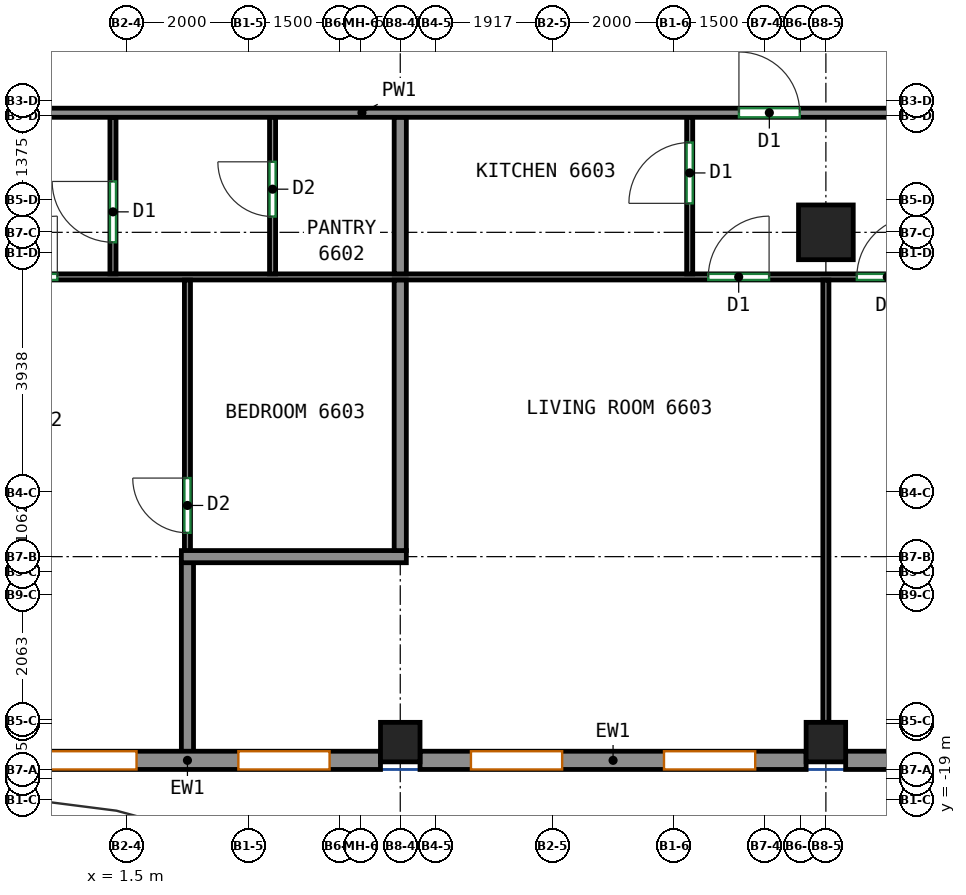
"""IFC4 building model, lengths in metres.
Left out: names, types, materials, properties, quantities, classifications, styles, units other than length and angle.
Written with IfcOpenShell. Run it as: python <this file> out.ifc"""

import sys

from ifc_helpers import new_model, si_unit, direction, frame, frame_2d, origin, origin_2d, place, context, subcontext, project, spatial, rectangle, extrude, source, transform, mapped, element, fill, save


model = new_model("IFC4")
c1 = context("Model", 3, precision=1e-05, world=origin(), true_north=direction((0.0, 1.0)))
c2 = subcontext(c1, "Body", "Model", "MODEL_VIEW")
j1 = project(units=[si_unit("LENGTHUNIT", "METRE"), si_unit("PLANEANGLEUNIT", "RADIAN")], contexts=[c1])
p1 = place(None, origin())
s1 = spatial("IfcSite", under=j1, at=p1, CompositionType="ELEMENT")
p2 = place(p1, origin())
s2 = spatial("IfcBuilding", under=s1, at=p2, CompositionType="ELEMENT")
p3 = place(p2, frame((0.0, 0.0, 270.4)))
s3 = spatial("IfcBuildingStorey", under=s2, at=p3, CompositionType="ELEMENT", Elevation=270.4)
m1 = source(origin(), c2, "Body", "SweptSolid", [
    extrude(rectangle(XDim=0.65, YDim=0.65, at=origin_2d()), origin(), (0.0, 0.0, 1.0), 3.12),
])
for number, where, z_axis, x_axis in (
    (1, (6.0, -18.05, 0.0), (0.0, 0.0, 1.0), (1.0, 0.0, 0.0)),
    (2, (13.0, -18.05, 0.0), (0.0, 0.0, 1.0), (1.0, 0.0, 0.0)),
):
    element("IfcColumn", number, at=place(p3, frame(where, z_axis=z_axis, x_axis=x_axis)), inside=s3, PredefinedType="COLUMN", context=c2, shape_type="MappedRepresentation", body=[
        mapped(m1, transform((0.0, 0.0, 0.0))),
    ])
m2 = source(origin(), c2, "Body", "SweptSolid", [
    extrude(rectangle(XDim=0.9, YDim=0.9, at=origin_2d()), origin(), (0.0, 0.0, 1.0), 3.12),
])
p4 = place(p3, frame((13.0, -9.667, 0.0), z_axis=(0.0, 0.0, 1.0), x_axis=(1.0, 0.0, 0.0)))
e3 = element("IfcColumn", 3, at=p4, inside=s3, PredefinedType="COLUMN", context=c2, shape_type="MappedRepresentation", body=[
    mapped(m2, transform((0.0, 0.0, 0.0))),
])
m3 = source(origin(), c2, "Body", "SweptSolid", [
    extrude(rectangle(XDim=6.35, YDim=0.3, at=frame_2d((3.175, 0.0))), origin(), (0.0, 0.0, 1.0), 3.12),
])
p5 = place(p3, frame((-0.675, -18.35, 0.0), z_axis=(0.0, 0.0, 1.0), x_axis=(1.0, 0.0, 0.0)))
e4 = element("IfcWall", 4, at=p5, inside=s3, PredefinedType="SOLIDWALL", context=c2, shape_type="MappedRepresentation", body=[
    mapped(m3, transform((0.0, 0.0, 0.0))),
])
p6 = place(p5, frame((0.837, 0.0, 0.8)))
e5 = element("IfcOpeningElement", 5, at=p6, cuts=e4, PredefinedType="OPENING", context=c2, shape_type="SweptSolid", body=[
    extrude(rectangle(XDim=1.5, YDim=2.05, at=frame_2d((0.75, 1.025))), frame((0.0, 0.16, 0.0), z_axis=(0.0, -1.0, 0.0), x_axis=(1.0, 0.0, 0.0)), (0.0, 0.0, 1.0), 0.32),
])
p7 = place(p5, frame((4.012, 0.0, 0.8)))
e6 = element("IfcOpeningElement", 6, at=p7, cuts=e4, PredefinedType="OPENING", context=c2, shape_type="SweptSolid", body=[
    extrude(rectangle(XDim=1.5, YDim=2.05, at=frame_2d((0.75, 1.025))), frame((0.0, 0.16, 0.0), z_axis=(0.0, -1.0, 0.0), x_axis=(1.0, 0.0, 0.0)), (0.0, 0.0, 1.0), 0.32),
])
p8 = place(p3, frame((6.325, -18.35, 0.0), z_axis=(0.0, 0.0, 1.0), x_axis=(1.0, 0.0, 0.0)))
e7 = element("IfcWall", 7, at=p8, inside=s3, PredefinedType="SOLIDWALL", context=c2, shape_type="MappedRepresentation", body=[
    mapped(m3, transform((0.0, 0.0, 0.0))),
])
p9 = place(p8, frame((0.837, 0.0, 0.8)))
e8 = element("IfcOpeningElement", 8, at=p9, cuts=e7, PredefinedType="OPENING", context=c2, shape_type="SweptSolid", body=[
    extrude(rectangle(XDim=1.5, YDim=2.05, at=frame_2d((0.75, 1.025))), frame((0.0, 0.16, 0.0), z_axis=(0.0, -1.0, 0.0), x_axis=(1.0, 0.0, 0.0)), (0.0, 0.0, 1.0), 0.32),
])
p10 = place(p8, frame((4.012, 0.0, 0.8)))
e9 = element("IfcOpeningElement", 9, at=p10, cuts=e7, PredefinedType="OPENING", context=c2, shape_type="SweptSolid", body=[
    extrude(rectangle(XDim=1.5, YDim=2.05, at=frame_2d((0.75, 1.025))), frame((0.0, 0.16, 0.0), z_axis=(0.0, -1.0, 0.0), x_axis=(1.0, 0.0, 0.0)), (0.0, 0.0, 1.0), 0.32),
])
p11 = place(p3, frame((13.325, -18.35, 0.0), z_axis=(0.0, 0.0, 1.0), x_axis=(1.0, 0.0, 0.0)))
e10 = element("IfcWall", 10, at=p11, inside=s3, PredefinedType="SOLIDWALL", context=c2, shape_type="MappedRepresentation", body=[
    mapped(m3, transform((0.0, 0.0, 0.0))),
])
p12 = place(p11, frame((0.837, 0.0, 0.8)))
e11 = element("IfcOpeningElement", 11, at=p12, cuts=e10, PredefinedType="OPENING", context=c2, shape_type="SweptSolid", body=[
    extrude(rectangle(XDim=1.5, YDim=2.05, at=frame_2d((0.75, 1.025))), frame((0.0, 0.16, 0.0), z_axis=(0.0, -1.0, 0.0), x_axis=(1.0, 0.0, 0.0)), (0.0, 0.0, 1.0), 0.32),
])
p13 = place(p11, frame((4.012, 0.0, 0.8)))
e12 = element("IfcOpeningElement", 12, at=p13, cuts=e10, PredefinedType="OPENING", context=c2, shape_type="SweptSolid", body=[
    extrude(rectangle(XDim=1.5, YDim=2.05, at=frame_2d((0.75, 1.025))), frame((0.0, 0.16, 0.0), z_axis=(0.0, -1.0, 0.0), x_axis=(1.0, 0.0, 0.0)), (0.0, 0.0, 1.0), 0.32),
])
p14 = place(p3, frame((-4.51, -7.7, 0.0), z_axis=(0.0, 0.0, 1.0), x_axis=(1.0, 0.0, 0.0)))
e13 = element("IfcWall", 13, at=p14, inside=s3, PredefinedType="PARTITIONING", context=c2, shape_type="SweptSolid", body=[
    extrude(rectangle(XDim=19.76, YDim=0.15, at=frame_2d((9.88, 0.0))), origin(), (0.0, 0.0, 1.0), 3.12),
])
p15 = place(p14, frame((3.566, 0.0, 0.0)))
e14 = element("IfcOpeningElement", 14, at=p15, cuts=e13, PredefinedType="OPENING", context=c2, shape_type="SweptSolid", body=[
    extrude(rectangle(XDim=1.0, YDim=2.1, at=frame_2d((0.5, 1.05))), frame((0.0, 0.085, 0.0), z_axis=(0.0, -1.0, 0.0), x_axis=(1.0, 0.0, 0.0)), (0.0, 0.0, 1.0), 0.17),
])
p16 = place(p14, frame((16.08, 0.0, 0.0)))
e15 = element("IfcOpeningElement", 15, at=p16, cuts=e13, PredefinedType="OPENING", context=c2, shape_type="SweptSolid", body=[
    extrude(rectangle(XDim=1.0, YDim=2.1, at=frame_2d((0.5, 1.05))), frame((0.0, 0.085, 0.0), z_axis=(0.0, -1.0, 0.0), x_axis=(1.0, 0.0, 0.0)), (0.0, 0.0, 1.0), 0.17),
])
p17 = place(p3, frame((-4.6, -10.4, 0.0), z_axis=(0.0, 0.0, 1.0), x_axis=(1.0, 0.0, 0.0)))
e16 = element("IfcWall", 16, at=p17, inside=s3, PredefinedType="PARTITIONING", context=c2, shape_type="SweptSolid", body=[
    extrude(rectangle(XDim=22.35, YDim=0.1, at=frame_2d((11.175, 0.0))), origin(), (0.0, 0.0, 1.0), 3.12),
])
p18 = place(p17, frame((3.96, 0.0, 0.0)))
e17 = element("IfcOpeningElement", 17, at=p18, cuts=e16, PredefinedType="OPENING", context=c2, shape_type="SweptSolid", body=[
    extrude(rectangle(XDim=1.0, YDim=2.1, at=frame_2d((0.5, 1.05))), frame((0.0, 0.06, 0.0), z_axis=(0.0, -1.0, 0.0), x_axis=(1.0, 0.0, 0.0)), (0.0, 0.0, 1.0), 0.12),
])
p19 = place(p17, frame((15.666, 0.0, 0.0)))
e18 = element("IfcOpeningElement", 18, at=p19, cuts=e16, PredefinedType="OPENING", context=c2, shape_type="SweptSolid", body=[
    extrude(rectangle(XDim=1.0, YDim=2.1, at=frame_2d((0.5, 1.05))), frame((0.0, 0.06, 0.0), z_axis=(0.0, -1.0, 0.0), x_axis=(1.0, 0.0, 0.0)), (0.0, 0.0, 1.0), 0.12),
])
p20 = place(p17, frame((18.109, 0.0, 0.0)))
e19 = element("IfcOpeningElement", 19, at=p20, cuts=e16, PredefinedType="OPENING", context=c2, shape_type="SweptSolid", body=[
    extrude(rectangle(XDim=1.0, YDim=2.1, at=frame_2d((0.5, 1.05))), frame((0.0, 0.06, 0.0), z_axis=(0.0, -1.0, 0.0), x_axis=(1.0, 0.0, 0.0)), (0.0, 0.0, 1.0), 0.12),
])
p21 = place(p3, frame((1.275, -10.35, 0.0), z_axis=(0.0, 0.0, 1.0), x_axis=(0.0, 1.0, 0.0)))
e20 = element("IfcWall", 20, at=p21, inside=s3, PredefinedType="PARTITIONING", context=c2, shape_type="SweptSolid", body=[
    extrude(rectangle(XDim=2.573, YDim=0.1, at=frame_2d((1.287, 0.0))), origin(), (0.0, 0.0, 1.0), 3.12),
])
p22 = place(p21, frame((0.52, 0.0, 0.0)))
e21 = element("IfcOpeningElement", 21, at=p22, cuts=e20, PredefinedType="OPENING", context=c2, shape_type="SweptSolid", body=[
    extrude(rectangle(XDim=1.0, YDim=2.1, at=frame_2d((0.5, 1.05))), frame((0.0, 0.06, 0.0), z_axis=(0.0, -1.0, 0.0), x_axis=(1.0, 0.0, 0.0)), (0.0, 0.0, 1.0), 0.12),
])
p23 = place(p3, frame((3.9, -10.35, 0.0), z_axis=(0.0, 0.0, 1.0), x_axis=(0.0, 1.0, 0.0)))
e22 = element("IfcWall", 22, at=p23, inside=s3, PredefinedType="PARTITIONING", context=c2, shape_type="SweptSolid", body=[
    extrude(rectangle(XDim=2.573, YDim=0.1, at=frame_2d((1.287, 0.0))), origin(), (0.0, 0.0, 1.0), 3.12),
])
p24 = place(p23, frame((0.943, 0.0, 0.0)))
e23 = element("IfcOpeningElement", 23, at=p24, cuts=e22, PredefinedType="OPENING", context=c2, shape_type="SweptSolid", body=[
    extrude(rectangle(XDim=0.9, YDim=2.1, at=frame_2d((0.45, 1.05))), frame((0.0, 0.06, 0.0), z_axis=(0.0, -1.0, 0.0), x_axis=(1.0, 0.0, 0.0)), (0.0, 0.0, 1.0), 0.12),
])
p25 = place(p3, frame((6.0, -10.35, 0.0), z_axis=(0.0, 0.0, 1.0), x_axis=(0.0, 1.0, 0.0)))
e24 = element("IfcWall", 24, at=p25, inside=s3, PredefinedType="PARTITIONING", context=c2, shape_type="SweptSolid", body=[
    extrude(rectangle(XDim=2.573, YDim=0.2, at=frame_2d((1.287, 0.0))), origin(), (0.0, 0.0, 1.0), 3.12),
])
p26 = place(p3, frame((2.5, -14.91, 0.0), z_axis=(0.0, 0.0, 1.0), x_axis=(0.0, 1.0, 0.0)))
e25 = element("IfcWall", 25, at=p26, inside=s3, PredefinedType="PARTITIONING", context=c2, shape_type="SweptSolid", body=[
    extrude(rectangle(XDim=4.458, YDim=0.1, at=frame_2d((2.229, 0.0))), origin(), (0.0, 0.0, 1.0), 3.12),
])
p27 = place(p26, frame((0.302, 0.0, 0.0)))
e26 = element("IfcOpeningElement", 26, at=p27, cuts=e25, PredefinedType="OPENING", context=c2, shape_type="SweptSolid", body=[
    extrude(rectangle(XDim=0.9, YDim=2.1, at=frame_2d((0.45, 1.05))), frame((0.0, 0.06, 0.0), z_axis=(0.0, -1.0, 0.0), x_axis=(1.0, 0.0, 0.0)), (0.0, 0.0, 1.0), 0.12),
])
p28 = place(p3, frame((2.5, -18.25, 0.0), z_axis=(0.0, 0.0, 1.0), x_axis=(0.0, 1.0, 0.0)))
e27 = element("IfcWall", 27, at=p28, inside=s3, PredefinedType="PARTITIONING", context=c2, shape_type="SweptSolid", body=[
    extrude(rectangle(XDim=3.16, YDim=0.2, at=frame_2d((1.58, 0.0))), origin(), (0.0, 0.0, 1.0), 3.12),
])
p29 = place(p3, frame((2.4, -15.0, 0.0), z_axis=(0.0, 0.0, 1.0), x_axis=(1.0, 0.0, 0.0)))
e28 = element("IfcWall", 28, at=p29, inside=s3, PredefinedType="PARTITIONING", context=c2, shape_type="SweptSolid", body=[
    extrude(rectangle(XDim=3.7, YDim=0.2, at=frame_2d((1.85, 0.0))), origin(), (0.0, 0.0, 1.0), 3.12),
])
p30 = place(p3, frame((6.0, -14.9, 0.0), z_axis=(0.0, 0.0, 1.0), x_axis=(0.0, 1.0, 0.0)))
e29 = element("IfcWall", 29, at=p30, inside=s3, PredefinedType="PARTITIONING", context=c2, shape_type="SweptSolid", body=[
    extrude(rectangle(XDim=4.448, YDim=0.2, at=frame_2d((2.224, 0.0))), origin(), (0.0, 0.0, 1.0), 3.12),
])
p31 = place(p3, frame((10.76, -10.35, 0.0), z_axis=(0.0, 0.0, 1.0), x_axis=(0.0, 1.0, 0.0)))
e30 = element("IfcWall", 30, at=p31, inside=s3, PredefinedType="PARTITIONING", context=c2, shape_type="SweptSolid", body=[
    extrude(rectangle(XDim=2.573, YDim=0.1, at=frame_2d((1.287, 0.0))), origin(), (0.0, 0.0, 1.0), 3.12),
])
p32 = place(p31, frame((1.16, 0.0, 0.0)))
e31 = element("IfcOpeningElement", 31, at=p32, cuts=e30, PredefinedType="OPENING", context=c2, shape_type="SweptSolid", body=[
    extrude(rectangle(XDim=1.0, YDim=2.1, at=frame_2d((0.5, 1.05))), frame((0.0, 0.06, 0.0), z_axis=(0.0, -1.0, 0.0), x_axis=(1.0, 0.0, 0.0)), (0.0, 0.0, 1.0), 0.12),
])
p33 = place(p3, frame((13.0, -17.725, 0.0), z_axis=(0.0, 0.0, 1.0), x_axis=(0.0, 1.0, 0.0)))
e32 = element("IfcWall", 32, at=p33, inside=s3, PredefinedType="PARTITIONING", context=c2, shape_type="SweptSolid", body=[
    extrude(rectangle(XDim=7.273, YDim=0.1, at=frame_2d((3.637, 0.0))), origin(), (0.0, 0.0, 1.0), 3.12),
])
p34 = place(p6, origin())
e33 = element("IfcWindow", 33, at=p34, inside=s3, PartitioningType="SINGLE_PANEL", PredefinedType="WINDOW", context=c2, shape_type="SweptSolid", body=[
    extrude(rectangle(XDim=1.5, YDim=2.05, at=frame_2d((0.75, 1.025))), frame((0.0, 0.03, 0.0), z_axis=(0.0, -1.0, 0.0), x_axis=(1.0, 0.0, 0.0)), (0.0, 0.0, 1.0), 0.06),
])
fill(e5, e33)
p35 = place(p7, origin())
e34 = element("IfcWindow", 34, at=p35, inside=s3, PartitioningType="SINGLE_PANEL", PredefinedType="WINDOW", context=c2, shape_type="SweptSolid", body=[
    extrude(rectangle(XDim=1.5, YDim=2.05, at=frame_2d((0.75, 1.025))), frame((0.0, 0.03, 0.0), z_axis=(0.0, -1.0, 0.0), x_axis=(1.0, 0.0, 0.0)), (0.0, 0.0, 1.0), 0.06),
])
fill(e6, e34)
p36 = place(p9, origin())
e35 = element("IfcWindow", 35, at=p36, inside=s3, PartitioningType="SINGLE_PANEL", PredefinedType="WINDOW", context=c2, shape_type="SweptSolid", body=[
    extrude(rectangle(XDim=1.5, YDim=2.05, at=frame_2d((0.75, 1.025))), frame((0.0, 0.03, 0.0), z_axis=(0.0, -1.0, 0.0), x_axis=(1.0, 0.0, 0.0)), (0.0, 0.0, 1.0), 0.06),
])
fill(e8, e35)
p37 = place(p10, origin())
e36 = element("IfcWindow", 36, at=p37, inside=s3, PartitioningType="SINGLE_PANEL", PredefinedType="WINDOW", context=c2, shape_type="SweptSolid", body=[
    extrude(rectangle(XDim=1.5, YDim=2.05, at=frame_2d((0.75, 1.025))), frame((0.0, 0.03, 0.0), z_axis=(0.0, -1.0, 0.0), x_axis=(1.0, 0.0, 0.0)), (0.0, 0.0, 1.0), 0.06),
])
fill(e9, e36)
p38 = place(p27, origin())
e37 = element("IfcDoor", 37, at=p38, inside=s3, OperationType="SINGLE_SWING_RIGHT", PredefinedType="DOOR", context=c2, shape_type="SweptSolid", body=[
    extrude(rectangle(XDim=0.9, YDim=2.1, at=frame_2d((0.45, 1.05))), frame((0.0, 0.025, 0.0), z_axis=(0.0, -1.0, 0.0), x_axis=(1.0, 0.0, 0.0)), (0.0, 0.0, 1.0), 0.05),
])
fill(e26, e37)
p39 = place(p18, origin())
e38 = element("IfcDoor", 38, at=p39, inside=s3, OperationType="SINGLE_SWING_RIGHT", PredefinedType="DOOR", context=c2, shape_type="SweptSolid", body=[
    extrude(rectangle(XDim=1.0, YDim=2.1, at=frame_2d((0.5, 1.05))), frame((0.0, 0.025, 0.0), z_axis=(0.0, -1.0, 0.0), x_axis=(1.0, 0.0, 0.0)), (0.0, 0.0, 1.0), 0.05),
])
fill(e17, e38)
p40 = place(p19, origin())
e39 = element("IfcDoor", 39, at=p40, inside=s3, OperationType="SINGLE_SWING_RIGHT", PredefinedType="DOOR", context=c2, shape_type="SweptSolid", body=[
    extrude(rectangle(XDim=1.0, YDim=2.1, at=frame_2d((0.5, 1.05))), frame((0.0, 0.025, 0.0), z_axis=(0.0, -1.0, 0.0), x_axis=(1.0, 0.0, 0.0)), (0.0, 0.0, 1.0), 0.05),
])
fill(e18, e39)
p41 = place(p20, origin())
e40 = element("IfcDoor", 40, at=p41, inside=s3, OperationType="SINGLE_SWING_RIGHT", PredefinedType="DOOR", context=c2, shape_type="SweptSolid", body=[
    extrude(rectangle(XDim=1.0, YDim=2.1, at=frame_2d((0.5, 1.05))), frame((0.0, 0.025, 0.0), z_axis=(0.0, -1.0, 0.0), x_axis=(1.0, 0.0, 0.0)), (0.0, 0.0, 1.0), 0.05),
])
fill(e19, e40)
p42 = place(p22, origin())
e41 = element("IfcDoor", 41, at=p42, inside=s3, OperationType="SINGLE_SWING_RIGHT", PredefinedType="DOOR", context=c2, shape_type="SweptSolid", body=[
    extrude(rectangle(XDim=1.0, YDim=2.1, at=frame_2d((0.5, 1.05))), frame((0.0, 0.025, 0.0), z_axis=(0.0, -1.0, 0.0), x_axis=(1.0, 0.0, 0.0)), (0.0, 0.0, 1.0), 0.05),
])
fill(e21, e41)
p43 = place(p24, origin())
e42 = element("IfcDoor", 42, at=p43, inside=s3, OperationType="SINGLE_SWING_RIGHT", PredefinedType="DOOR", context=c2, shape_type="SweptSolid", body=[
    extrude(rectangle(XDim=0.9, YDim=2.1, at=frame_2d((0.45, 1.05))), frame((0.0, 0.025, 0.0), z_axis=(0.0, -1.0, 0.0), x_axis=(1.0, 0.0, 0.0)), (0.0, 0.0, 1.0), 0.05),
])
fill(e23, e42)
p44 = place(p32, origin())
e43 = element("IfcDoor", 43, at=p44, inside=s3, OperationType="SINGLE_SWING_LEFT", PredefinedType="DOOR", context=c2, shape_type="SweptSolid", body=[
    extrude(rectangle(XDim=1.0, YDim=2.1, at=frame_2d((0.5, 1.05))), frame((0.0, 0.025, 0.0), z_axis=(0.0, -1.0, 0.0), x_axis=(1.0, 0.0, 0.0)), (0.0, 0.0, 1.0), 0.05),
])
fill(e31, e43)
p45 = place(p16, origin())
e44 = element("IfcDoor", 44, at=p45, inside=s3, OperationType="SINGLE_SWING_LEFT", PredefinedType="DOOR", context=c2, shape_type="SweptSolid", body=[
    extrude(rectangle(XDim=1.0, YDim=2.1, at=frame_2d((0.5, 1.05))), frame((0.0, 0.025, 0.0), z_axis=(0.0, -1.0, 0.0), x_axis=(1.0, 0.0, 0.0)), (0.0, 0.0, 1.0), 0.05),
])
fill(e15, e44)
save(model, sys.argv[1])
